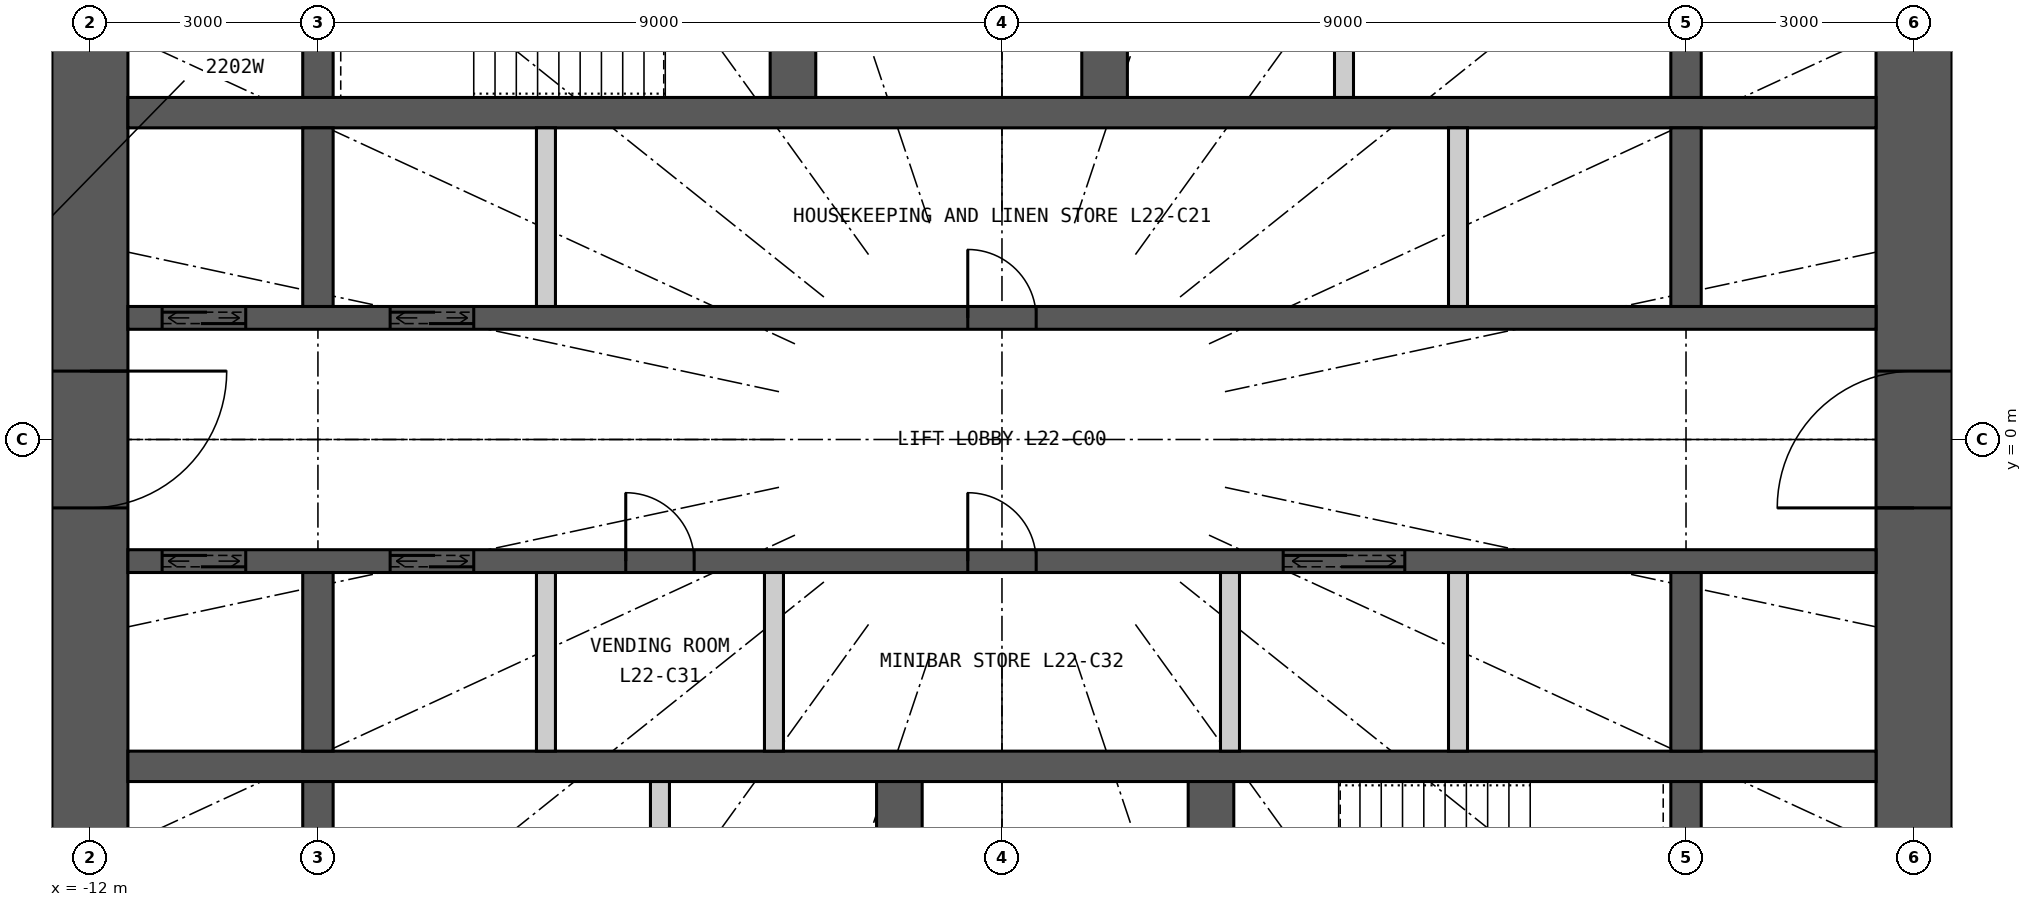
"""IFC4 building model, lengths in metres.
Left out: names, types, materials, properties, quantities, classifications, styles, units other than length and angle.
Written with IfcOpenShell. Run it as: python <this file> out.ifc"""

import sys

from ifc_helpers import new_model, si_unit, direction, frame, frame_2d, origin, place, context, subcontext, project, spatial, rectangle, extrude, element, fill, save


model = new_model("IFC4")
c1 = context("Model", 3, precision=1e-05, world=origin(), true_north=direction((0.0, 1.0)))
c2 = subcontext(c1, "Body", "Model", "MODEL_VIEW")
j1 = project(units=[si_unit("LENGTHUNIT", "METRE"), si_unit("PLANEANGLEUNIT", "RADIAN")], contexts=[c1])
p1 = place(None, origin())
s1 = spatial("IfcSite", under=j1, at=p1, CompositionType="ELEMENT")
p2 = place(p1, origin())
s2 = spatial("IfcBuilding", under=s1, at=p2, CompositionType="ELEMENT")
p3 = place(p2, frame((0.0, 0.0, 87.0)))
s3 = spatial("IfcBuildingStorey", under=s2, at=p3, CompositionType="ELEMENT", Elevation=87.0)
p4 = place(p3, frame((12.0, -7.5, 0.0), z_axis=(0.0, 0.0, 1.0), x_axis=(0.0, 1.0, 0.0)))
e1 = element("IfcWall", 1, at=p4, inside=s3, PredefinedType="SHEAR", context=c2, shape_type="SweptSolid", body=[
    extrude(rectangle(XDim=15.0, YDim=1.0, at=frame_2d((7.5, 0.0))), origin(), (0.0, 0.0, 1.0), 3.3),
])
p5 = place(p4, frame((6.6, 0.0, 0.0)))
e2 = element("IfcOpeningElement", 2, at=p5, cuts=e1, PredefinedType="OPENING", context=c2, shape_type="SweptSolid", body=[
    extrude(rectangle(XDim=1.8, YDim=2.2, at=frame_2d((0.9, 1.1))), frame((0.0, 0.51, 0.0), z_axis=(0.0, -1.0, 0.0), x_axis=(1.0, 0.0, 0.0)), (0.0, 0.0, 1.0), 1.02),
])
p6 = place(p3, frame((-12.0, 7.5, 0.0), z_axis=(0.0, 0.0, 1.0), x_axis=(0.0, -1.0, 0.0)))
e3 = element("IfcWall", 3, at=p6, inside=s3, PredefinedType="SHEAR", context=c2, shape_type="SweptSolid", body=[
    extrude(rectangle(XDim=15.0, YDim=1.0, at=frame_2d((7.5, 0.0))), origin(), (0.0, 0.0, 1.0), 3.3),
])
p7 = place(p6, frame((6.6, 0.0, 0.0)))
e4 = element("IfcOpeningElement", 4, at=p7, cuts=e3, PredefinedType="OPENING", context=c2, shape_type="SweptSolid", body=[
    extrude(rectangle(XDim=1.8, YDim=2.2, at=frame_2d((0.9, 1.1))), frame((0.0, 0.51, 0.0), z_axis=(0.0, -1.0, 0.0), x_axis=(1.0, 0.0, 0.0)), (0.0, 0.0, 1.0), 1.02),
])
p8 = place(p3, frame((-11.5, 4.3, 0.0), z_axis=(0.0, 0.0, 1.0), x_axis=(1.0, 0.0, 0.0)))
e5 = element("IfcWall", 5, at=p8, inside=s3, PredefinedType="SHEAR", context=c2, shape_type="SweptSolid", body=[
    extrude(rectangle(XDim=23.0, YDim=0.4, at=frame_2d((11.5, 0.0))), origin(), (0.0, 0.0, 1.0), 3.3),
])
p9 = place(p3, frame((-11.5, 1.6, 0.0), z_axis=(0.0, 0.0, 1.0), x_axis=(1.0, 0.0, 0.0)))
e6 = element("IfcWall", 6, at=p9, inside=s3, PredefinedType="SHEAR", context=c2, shape_type="SweptSolid", body=[
    extrude(rectangle(XDim=23.0, YDim=0.3, at=frame_2d((11.5, 0.0))), origin(), (0.0, 0.0, 1.0), 3.3),
])
p10 = place(p9, frame((0.45, 0.0, 0.0)))
e7 = element("IfcOpeningElement", 7, at=p10, cuts=e6, PredefinedType="OPENING", context=c2, shape_type="SweptSolid", body=[
    extrude(rectangle(XDim=1.1, YDim=2.2, at=frame_2d((0.55, 1.1))), frame((0.0, 0.16, 0.0), z_axis=(0.0, -1.0, 0.0), x_axis=(1.0, 0.0, 0.0)), (0.0, 0.0, 1.0), 0.32),
])
p11 = place(p9, frame((3.45, 0.0, 0.0)))
e8 = element("IfcOpeningElement", 8, at=p11, cuts=e6, PredefinedType="OPENING", context=c2, shape_type="SweptSolid", body=[
    extrude(rectangle(XDim=1.1, YDim=2.2, at=frame_2d((0.55, 1.1))), frame((0.0, 0.16, 0.0), z_axis=(0.0, -1.0, 0.0), x_axis=(1.0, 0.0, 0.0)), (0.0, 0.0, 1.0), 0.32),
])
p12 = place(p9, frame((11.05, 0.0, 0.0)))
e9 = element("IfcOpeningElement", 9, at=p12, cuts=e6, PredefinedType="OPENING", context=c2, shape_type="SweptSolid", body=[
    extrude(rectangle(XDim=0.9, YDim=2.2, at=frame_2d((0.45, 1.1))), frame((0.0, 0.16, 0.0), z_axis=(0.0, -1.0, 0.0), x_axis=(1.0, 0.0, 0.0)), (0.0, 0.0, 1.0), 0.32),
])
p13 = place(p3, frame((-11.5, -4.3, 0.0), z_axis=(0.0, 0.0, 1.0), x_axis=(1.0, 0.0, 0.0)))
e10 = element("IfcWall", 10, at=p13, inside=s3, PredefinedType="SHEAR", context=c2, shape_type="SweptSolid", body=[
    extrude(rectangle(XDim=23.0, YDim=0.4, at=frame_2d((11.5, 0.0))), origin(), (0.0, 0.0, 1.0), 3.3),
])
p14 = place(p3, frame((-11.5, -1.6, 0.0), z_axis=(0.0, 0.0, 1.0), x_axis=(1.0, 0.0, 0.0)))
e11 = element("IfcWall", 11, at=p14, inside=s3, PredefinedType="SHEAR", context=c2, shape_type="SweptSolid", body=[
    extrude(rectangle(XDim=23.0, YDim=0.3, at=frame_2d((11.5, 0.0))), origin(), (0.0, 0.0, 1.0), 3.3),
])
p15 = place(p14, frame((0.45, 0.0, 0.0)))
e12 = element("IfcOpeningElement", 12, at=p15, cuts=e11, PredefinedType="OPENING", context=c2, shape_type="SweptSolid", body=[
    extrude(rectangle(XDim=1.1, YDim=2.2, at=frame_2d((0.55, 1.1))), frame((0.0, 0.16, 0.0), z_axis=(0.0, -1.0, 0.0), x_axis=(1.0, 0.0, 0.0)), (0.0, 0.0, 1.0), 0.32),
])
p16 = place(p14, frame((3.45, 0.0, 0.0)))
e13 = element("IfcOpeningElement", 13, at=p16, cuts=e11, PredefinedType="OPENING", context=c2, shape_type="SweptSolid", body=[
    extrude(rectangle(XDim=1.1, YDim=2.2, at=frame_2d((0.55, 1.1))), frame((0.0, 0.16, 0.0), z_axis=(0.0, -1.0, 0.0), x_axis=(1.0, 0.0, 0.0)), (0.0, 0.0, 1.0), 0.32),
])
p17 = place(p14, frame((15.2, 0.0, 0.0)))
e14 = element("IfcOpeningElement", 14, at=p17, cuts=e11, PredefinedType="OPENING", context=c2, shape_type="SweptSolid", body=[
    extrude(rectangle(XDim=1.6, YDim=2.4, at=frame_2d((0.8, 1.2))), frame((0.0, 0.16, 0.0), z_axis=(0.0, -1.0, 0.0), x_axis=(1.0, 0.0, 0.0)), (0.0, 0.0, 1.0), 0.32),
])
p18 = place(p14, frame((6.55, 0.0, 0.0)))
e15 = element("IfcOpeningElement", 15, at=p18, cuts=e11, PredefinedType="OPENING", context=c2, shape_type="SweptSolid", body=[
    extrude(rectangle(XDim=0.9, YDim=2.2, at=frame_2d((0.45, 1.1))), frame((0.0, 0.16, 0.0), z_axis=(0.0, -1.0, 0.0), x_axis=(1.0, 0.0, 0.0)), (0.0, 0.0, 1.0), 0.32),
])
p19 = place(p14, frame((11.05, 0.0, 0.0)))
e16 = element("IfcOpeningElement", 16, at=p19, cuts=e11, PredefinedType="OPENING", context=c2, shape_type="SweptSolid", body=[
    extrude(rectangle(XDim=0.9, YDim=2.2, at=frame_2d((0.45, 1.1))), frame((0.0, 0.16, 0.0), z_axis=(0.0, -1.0, 0.0), x_axis=(1.0, 0.0, 0.0)), (0.0, 0.0, 1.0), 0.32),
])
p20 = place(p3, frame((-9.0, 4.5, 0.0), z_axis=(0.0, 0.0, 1.0), x_axis=(0.0, 1.0, 0.0)))
e17 = element("IfcWall", 17, at=p20, inside=s3, PredefinedType="SHEAR", context=c2, shape_type="SweptSolid", body=[
    extrude(rectangle(XDim=3.0, YDim=0.4, at=frame_2d((1.5, 0.0))), origin(), (0.0, 0.0, 1.0), 3.3),
])
for number, where, z_axis, x_axis in (
    (18, (-9.0, 1.75, 0.0), (0.0, 0.0, 1.0), (0.0, 1.0, 0.0)),
    (19, (-9.0, -4.1, 0.0), (0.0, 0.0, 1.0), (0.0, 1.0, 0.0)),
):
    element("IfcWall", number, at=place(p3, frame(where, z_axis=z_axis, x_axis=x_axis)), inside=s3, PredefinedType="SHEAR", context=c2, shape_type="SweptSolid", body=[
        extrude(rectangle(XDim=2.35, YDim=0.4, at=frame_2d((1.175, 0.0))), origin(), (0.0, 0.0, 1.0), 3.3),
    ])
for number, where, z_axis, x_axis in (
    (20, (-9.0, -7.5, 0.0), (0.0, 0.0, 1.0), (0.0, 1.0, 0.0)),
    (21, (9.0, 4.5, 0.0), (0.0, 0.0, 1.0), (0.0, 1.0, 0.0)),
):
    element("IfcWall", number, at=place(p3, frame(where, z_axis=z_axis, x_axis=x_axis)), inside=s3, PredefinedType="SHEAR", context=c2, shape_type="SweptSolid", body=[
        extrude(rectangle(XDim=3.0, YDim=0.4, at=frame_2d((1.5, 0.0))), origin(), (0.0, 0.0, 1.0), 3.3),
    ])
for number, where, z_axis, x_axis in (
    (22, (9.0, 1.75, 0.0), (0.0, 0.0, 1.0), (0.0, 1.0, 0.0)),
    (23, (9.0, -4.1, 0.0), (0.0, 0.0, 1.0), (0.0, 1.0, 0.0)),
):
    element("IfcWall", number, at=place(p3, frame(where, z_axis=z_axis, x_axis=x_axis)), inside=s3, PredefinedType="SHEAR", context=c2, shape_type="SweptSolid", body=[
        extrude(rectangle(XDim=2.35, YDim=0.4, at=frame_2d((1.175, 0.0))), origin(), (0.0, 0.0, 1.0), 3.3),
    ])
p21 = place(p3, frame((9.0, -7.5, 0.0), z_axis=(0.0, 0.0, 1.0), x_axis=(0.0, 1.0, 0.0)))
e24 = element("IfcWall", 24, at=p21, inside=s3, PredefinedType="SHEAR", context=c2, shape_type="SweptSolid", body=[
    extrude(rectangle(XDim=3.0, YDim=0.4, at=frame_2d((1.5, 0.0))), origin(), (0.0, 0.0, 1.0), 3.3),
])
p22 = place(p3, frame((-2.75, 4.5, 0.0), z_axis=(0.0, 0.0, 1.0), x_axis=(0.0, 1.0, 0.0)))
e25 = element("IfcWall", 25, at=p22, inside=s3, PredefinedType="SHEAR", context=c2, shape_type="SweptSolid", body=[
    extrude(rectangle(XDim=3.0, YDim=0.6, at=frame_2d((1.5, 0.0))), origin(), (0.0, 0.0, 1.0), 3.3),
])
p23 = place(p22, frame((0.925, 0.0, 0.0)))
e26 = element("IfcOpeningElement", 26, at=p23, cuts=e25, PredefinedType="OPENING", context=c2, shape_type="SweptSolid", body=[
    extrude(rectangle(XDim=1.1, YDim=2.2, at=frame_2d((0.55, 1.1))), frame((0.0, 0.31, 0.0), z_axis=(0.0, -1.0, 0.0), x_axis=(1.0, 0.0, 0.0)), (0.0, 0.0, 1.0), 0.62),
])
p24 = place(p3, frame((1.35, 4.5, 0.0), z_axis=(0.0, 0.0, 1.0), x_axis=(0.0, 1.0, 0.0)))
e27 = element("IfcWall", 27, at=p24, inside=s3, PredefinedType="SHEAR", context=c2, shape_type="SweptSolid", body=[
    extrude(rectangle(XDim=3.0, YDim=0.6, at=frame_2d((1.5, 0.0))), origin(), (0.0, 0.0, 1.0), 3.3),
])
p25 = place(p24, frame((0.95, 0.0, 0.0)))
e28 = element("IfcOpeningElement", 28, at=p25, cuts=e27, PredefinedType="OPENING", context=c2, shape_type="SweptSolid", body=[
    extrude(rectangle(XDim=1.1, YDim=2.2, at=frame_2d((0.55, 1.1))), frame((0.0, 0.31, 0.0), z_axis=(0.0, -1.0, 0.0), x_axis=(1.0, 0.0, 0.0)), (0.0, 0.0, 1.0), 0.62),
])
p26 = place(p3, frame((4.5, 4.5, 0.0), z_axis=(0.0, 0.0, 1.0), x_axis=(0.0, 1.0, 0.0)))
e29 = element("IfcWall", 29, at=p26, inside=s3, PredefinedType="PARTITIONING", context=c2, shape_type="SweptSolid", body=[
    extrude(rectangle(XDim=3.0, YDim=0.25, at=frame_2d((1.5, 0.0))), origin(), (0.0, 0.0, 1.0), 3.3),
])
p27 = place(p3, frame((2.75, -7.5, 0.0), z_axis=(0.0, 0.0, 1.0), x_axis=(0.0, 1.0, 0.0)))
e30 = element("IfcWall", 30, at=p27, inside=s3, PredefinedType="SHEAR", context=c2, shape_type="SweptSolid", body=[
    extrude(rectangle(XDim=3.0, YDim=0.6, at=frame_2d((1.5, 0.0))), origin(), (0.0, 0.0, 1.0), 3.3),
])
p28 = place(p27, frame((0.975, 0.0, 0.0)))
e31 = element("IfcOpeningElement", 31, at=p28, cuts=e30, PredefinedType="OPENING", context=c2, shape_type="SweptSolid", body=[
    extrude(rectangle(XDim=1.1, YDim=2.2, at=frame_2d((0.55, 1.1))), frame((0.0, 0.31, 0.0), z_axis=(0.0, -1.0, 0.0), x_axis=(1.0, 0.0, 0.0)), (0.0, 0.0, 1.0), 0.62),
])
p29 = place(p3, frame((-1.35, -7.5, 0.0), z_axis=(0.0, 0.0, 1.0), x_axis=(0.0, 1.0, 0.0)))
e32 = element("IfcWall", 32, at=p29, inside=s3, PredefinedType="SHEAR", context=c2, shape_type="SweptSolid", body=[
    extrude(rectangle(XDim=3.0, YDim=0.6, at=frame_2d((1.5, 0.0))), origin(), (0.0, 0.0, 1.0), 3.3),
])
p30 = place(p29, frame((0.95, 0.0, 0.0)))
e33 = element("IfcOpeningElement", 33, at=p30, cuts=e32, PredefinedType="OPENING", context=c2, shape_type="SweptSolid", body=[
    extrude(rectangle(XDim=1.1, YDim=2.2, at=frame_2d((0.55, 1.1))), frame((0.0, 0.31, 0.0), z_axis=(0.0, -1.0, 0.0), x_axis=(1.0, 0.0, 0.0)), (0.0, 0.0, 1.0), 0.62),
])
p31 = place(p3, frame((-4.5, -7.5, 0.0), z_axis=(0.0, 0.0, 1.0), x_axis=(0.0, 1.0, 0.0)))
e34 = element("IfcWall", 34, at=p31, inside=s3, PredefinedType="PARTITIONING", context=c2, shape_type="SweptSolid", body=[
    extrude(rectangle(XDim=3.0, YDim=0.25, at=frame_2d((1.5, 0.0))), origin(), (0.0, 0.0, 1.0), 3.3),
])
for number, where, z_axis, x_axis in (
    (35, (-6.0, 1.75, 0.0), (0.0, 0.0, 1.0), (0.0, 1.0, 0.0)),
    (36, (6.0, 1.75, 0.0), (0.0, 0.0, 1.0), (0.0, 1.0, 0.0)),
    (37, (-6.0, -4.1, 0.0), (0.0, 0.0, 1.0), (0.0, 1.0, 0.0)),
    (38, (-3.0, -4.1, 0.0), (0.0, 0.0, 1.0), (0.0, 1.0, 0.0)),
    (39, (3.0, -4.1, 0.0), (0.0, 0.0, 1.0), (0.0, 1.0, 0.0)),
    (40, (6.0, -4.1, 0.0), (0.0, 0.0, 1.0), (0.0, 1.0, 0.0)),
):
    element("IfcWall", number, at=place(p3, frame(where, z_axis=z_axis, x_axis=x_axis)), inside=s3, PredefinedType="PARTITIONING", context=c2, shape_type="SweptSolid", body=[
        extrude(rectangle(XDim=2.35, YDim=0.25, at=frame_2d((1.175, 0.0))), origin(), (0.0, 0.0, 1.0), 3.3),
    ])
p32 = place(p10, origin())
e41 = element("IfcDoor", 41, at=p32, inside=s3, OperationType="DOUBLE_DOOR_SLIDING", PredefinedType="DOOR", context=c2, shape_type="SweptSolid", body=[
    extrude(rectangle(XDim=1.1, YDim=2.2, at=frame_2d((0.55, 1.1))), frame((0.0, 0.025, 0.0), z_axis=(0.0, -1.0, 0.0), x_axis=(1.0, 0.0, 0.0)), (0.0, 0.0, 1.0), 0.05),
])
fill(e7, e41)
p33 = place(p11, origin())
e42 = element("IfcDoor", 42, at=p33, inside=s3, OperationType="DOUBLE_DOOR_SLIDING", PredefinedType="DOOR", context=c2, shape_type="SweptSolid", body=[
    extrude(rectangle(XDim=1.1, YDim=2.2, at=frame_2d((0.55, 1.1))), frame((0.0, 0.025, 0.0), z_axis=(0.0, -1.0, 0.0), x_axis=(1.0, 0.0, 0.0)), (0.0, 0.0, 1.0), 0.05),
])
fill(e8, e42)
p34 = place(p15, origin())
e43 = element("IfcDoor", 43, at=p34, inside=s3, OperationType="DOUBLE_DOOR_SLIDING", PredefinedType="DOOR", context=c2, shape_type="SweptSolid", body=[
    extrude(rectangle(XDim=1.1, YDim=2.2, at=frame_2d((0.55, 1.1))), frame((0.0, 0.025, 0.0), z_axis=(0.0, -1.0, 0.0), x_axis=(1.0, 0.0, 0.0)), (0.0, 0.0, 1.0), 0.05),
])
fill(e12, e43)
p35 = place(p16, origin())
e44 = element("IfcDoor", 44, at=p35, inside=s3, OperationType="DOUBLE_DOOR_SLIDING", PredefinedType="DOOR", context=c2, shape_type="SweptSolid", body=[
    extrude(rectangle(XDim=1.1, YDim=2.2, at=frame_2d((0.55, 1.1))), frame((0.0, 0.025, 0.0), z_axis=(0.0, -1.0, 0.0), x_axis=(1.0, 0.0, 0.0)), (0.0, 0.0, 1.0), 0.05),
])
fill(e13, e44)
p36 = place(p17, origin())
e45 = element("IfcDoor", 45, at=p36, inside=s3, OperationType="DOUBLE_DOOR_SLIDING", PredefinedType="DOOR", context=c2, shape_type="SweptSolid", body=[
    extrude(rectangle(XDim=1.6, YDim=2.4, at=frame_2d((0.8, 1.2))), frame((0.0, 0.025, 0.0), z_axis=(0.0, -1.0, 0.0), x_axis=(1.0, 0.0, 0.0)), (0.0, 0.0, 1.0), 0.05),
])
fill(e14, e45)
p37 = place(p12, origin())
e46 = element("IfcDoor", 46, at=p37, inside=s3, OperationType="SINGLE_SWING_LEFT", PredefinedType="DOOR", context=c2, shape_type="SweptSolid", body=[
    extrude(rectangle(XDim=0.9, YDim=2.2, at=frame_2d((0.45, 1.1))), frame((0.0, 0.025, 0.0), z_axis=(0.0, -1.0, 0.0), x_axis=(1.0, 0.0, 0.0)), (0.0, 0.0, 1.0), 0.05),
])
fill(e9, e46)
p38 = place(p18, origin())
e47 = element("IfcDoor", 47, at=p38, inside=s3, OperationType="SINGLE_SWING_LEFT", PredefinedType="DOOR", context=c2, shape_type="SweptSolid", body=[
    extrude(rectangle(XDim=0.9, YDim=2.2, at=frame_2d((0.45, 1.1))), frame((0.0, 0.025, 0.0), z_axis=(0.0, -1.0, 0.0), x_axis=(1.0, 0.0, 0.0)), (0.0, 0.0, 1.0), 0.05),
])
fill(e15, e47)
p39 = place(p19, origin())
e48 = element("IfcDoor", 48, at=p39, inside=s3, OperationType="SINGLE_SWING_LEFT", PredefinedType="DOOR", context=c2, shape_type="SweptSolid", body=[
    extrude(rectangle(XDim=0.9, YDim=2.2, at=frame_2d((0.45, 1.1))), frame((0.0, 0.025, 0.0), z_axis=(0.0, -1.0, 0.0), x_axis=(1.0, 0.0, 0.0)), (0.0, 0.0, 1.0), 0.05),
])
fill(e16, e48)
p40 = place(p5, origin())
e49 = element("IfcDoor", 49, at=p40, inside=s3, OperationType="DOUBLE_DOOR_DOUBLE_SWING", PredefinedType="DOOR", context=c2, shape_type="SweptSolid", body=[
    extrude(rectangle(XDim=1.8, YDim=2.2, at=frame_2d((0.9, 1.1))), frame((0.0, 0.025, 0.0), z_axis=(0.0, -1.0, 0.0), x_axis=(1.0, 0.0, 0.0)), (0.0, 0.0, 1.0), 0.05),
])
fill(e2, e49)
p41 = place(p7, origin())
e50 = element("IfcDoor", 50, at=p41, inside=s3, OperationType="DOUBLE_DOOR_DOUBLE_SWING", PredefinedType="DOOR", context=c2, shape_type="SweptSolid", body=[
    extrude(rectangle(XDim=1.8, YDim=2.2, at=frame_2d((0.9, 1.1))), frame((0.0, 0.025, 0.0), z_axis=(0.0, -1.0, 0.0), x_axis=(1.0, 0.0, 0.0)), (0.0, 0.0, 1.0), 0.05),
])
fill(e4, e50)
save(model, sys.argv[1])
